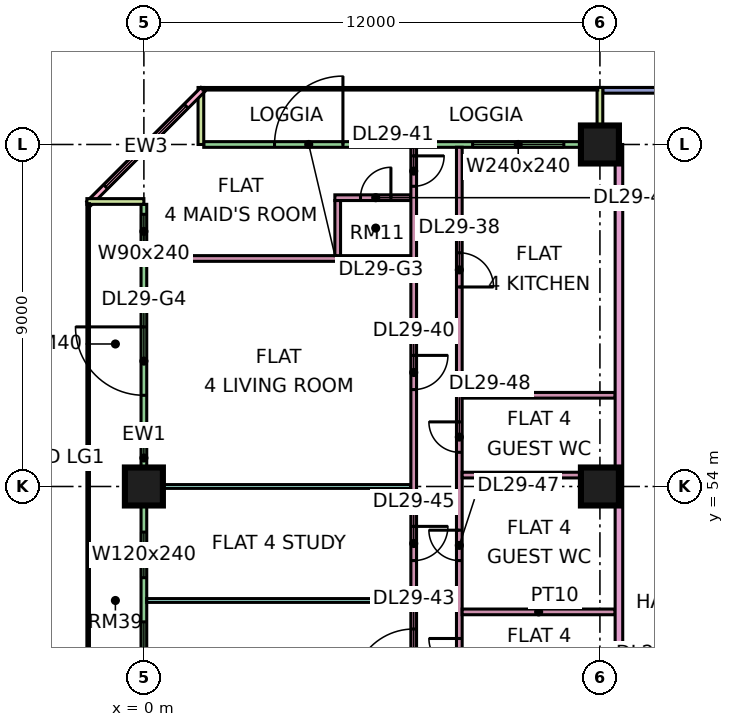
"""IFC4 building model, lengths in metres.
Left out: names, types, materials, properties, quantities, classifications, styles, units other than length and angle.
Written with IfcOpenShell. Run it as: python <this file> out.ifc"""

import sys

from ifc_helpers import new_model, si_unit, direction, frame, frame_2d, origin, origin_2d, place, context, subcontext, project, spatial, rectangle, extrude, element, fill, save


model = new_model("IFC4")
c1 = context("Model", 3, precision=1e-05, world=origin(), true_north=direction((0.0, 1.0)))
c2 = subcontext(c1, "Body", "Model", "MODEL_VIEW")
j1 = project(units=[si_unit("LENGTHUNIT", "METRE"), si_unit("PLANEANGLEUNIT", "RADIAN")], contexts=[c1])
p1 = place(None, origin())
s1 = spatial("IfcSite", under=j1, at=p1, CompositionType="ELEMENT")
p2 = place(p1, origin())
s2 = spatial("IfcBuilding", under=s1, at=p2, CompositionType="ELEMENT")
p3 = place(p2, frame((0.0, 0.0, 125.65)))
s3 = spatial("IfcBuildingStorey", under=s2, at=p3, CompositionType="ELEMENT", Elevation=125.65)
for number, where, z_axis, x_axis in (
    (1, (0.0, 54.0, 0.0), (0.0, 0.0, 1.0), (1.0, 0.0, 0.0)),
    (2, (12.0, 54.0, 0.0), (0.0, 0.0, 1.0), (1.0, 0.0, 0.0)),
    (3, (12.0, 63.0, 0.0), (0.0, 0.0, 1.0), (1.0, 0.0, 0.0)),
):
    element("IfcColumn", number, at=place(p3, frame(where, z_axis=z_axis, x_axis=x_axis)), inside=s3, PredefinedType="COLUMN", context=c2, shape_type="SweptSolid", body=[
        extrude(rectangle(XDim=1.0, YDim=1.0, at=origin_2d()), origin(), (0.0, 0.0, 1.0), 3.75),
    ])
p4 = place(p3, frame((22.5, 64.425, 0.0), z_axis=(0.0, 0.0, 1.0), x_axis=(-1.0, 0.0, 0.0)))
e4 = element("IfcWall", 4, at=p4, inside=s3, PredefinedType="SOLIDWALL", context=c2, shape_type="SweptSolid", body=[
    extrude(rectangle(XDim=10.425, YDim=0.15, at=frame_2d((5.212, 0.0))), origin(), (0.0, 0.0, 1.0), 3.35),
])
p5 = place(p4, frame((1.95, 0.0, 0.45)))
e5 = element("IfcOpeningElement", 5, at=p5, cuts=e4, PredefinedType="OPENING", context=c2, shape_type="SweptSolid", body=[
    extrude(rectangle(XDim=3.0, YDim=2.4, at=frame_2d((1.5, 1.2))), frame((0.0, 0.085, 0.0), z_axis=(0.0, -1.0, 0.0), x_axis=(1.0, 0.0, 0.0)), (0.0, 0.0, 1.0), 0.17),
])
p6 = place(p3, frame((11.925, 63.0, 0.0), z_axis=(0.0, 0.0, 1.0), x_axis=(-1.0, 0.0, 0.0)))
e6 = element("IfcWall", 6, at=p6, inside=s3, PredefinedType="SOLIDWALL", context=c2, shape_type="SweptSolid", body=[
    extrude(rectangle(XDim=10.35, YDim=0.15, at=frame_2d((5.175, 0.0))), origin(), (0.0, 0.0, 1.0), 3.35),
])
p7 = place(p6, frame((0.875, 0.0, 0.45)))
e7 = element("IfcOpeningElement", 7, at=p7, cuts=e6, PredefinedType="OPENING", context=c2, shape_type="SweptSolid", body=[
    extrude(rectangle(XDim=2.4, YDim=2.4, at=frame_2d((1.2, 1.2))), frame((0.0, 0.085, 0.0), z_axis=(0.0, -1.0, 0.0), x_axis=(1.0, 0.0, 0.0)), (0.0, 0.0, 1.0), 0.17),
])
p8 = place(p6, frame((6.688, 0.0, 0.0)))
e8 = element("IfcOpeningElement", 8, at=p8, cuts=e6, PredefinedType="OPENING", context=c2, shape_type="SweptSolid", body=[
    extrude(rectangle(XDim=1.8, YDim=2.4, at=frame_2d((0.9, 1.2))), frame((0.0, 0.085, 0.0), z_axis=(0.0, -1.0, 0.0), x_axis=(1.0, 0.0, 0.0)), (0.0, 0.0, 1.0), 0.17),
])
for number, where, z_axis, x_axis in (
    (9, (12.0, 64.5, 0.0), (0.0, 0.0, 1.0), (0.0, -1.0, 0.0)),
    (10, (1.5, 64.5, 0.0), (0.0, 0.0, 1.0), (0.0, -1.0, 0.0)),
):
    element("IfcWall", number, at=place(p3, frame(where, z_axis=z_axis, x_axis=x_axis)), inside=s3, PredefinedType="SOLIDWALL", context=c2, shape_type="SweptSolid", body=[
        extrude(rectangle(XDim=1.5, YDim=0.15, at=frame_2d((0.75, 0.0))), origin(), (0.0, 0.0, 1.0), 3.35),
    ])
p9 = place(p3, frame((1.553, 64.447, 0.0), z_axis=(0.0, 0.0, 1.0), x_axis=(-0.707106781187, -0.707106781187, 0.0)))
e11 = element("IfcWall", 11, at=p9, inside=s3, PredefinedType="SOLIDWALL", context=c2, shape_type="SweptSolid", body=[
    extrude(rectangle(XDim=4.243, YDim=0.15, at=frame_2d((2.121, 0.0))), origin(), (0.0, 0.0, 1.0), 3.35),
])
p10 = place(p9, frame((0.621, 0.0, 0.45)))
e12 = element("IfcOpeningElement", 12, at=p10, cuts=e11, PredefinedType="OPENING", context=c2, shape_type="SweptSolid", body=[
    extrude(rectangle(XDim=3.0, YDim=2.4, at=frame_2d((1.5, 1.2))), frame((0.0, 0.085, 0.0), z_axis=(0.0, -1.0, 0.0), x_axis=(1.0, 0.0, 0.0)), (0.0, 0.0, 1.0), 0.17),
])
p11 = place(p3, frame((0.0, 61.425, 0.0), z_axis=(0.0, 0.0, 1.0), x_axis=(0.0, -1.0, 0.0)))
e13 = element("IfcWall", 13, at=p11, inside=s3, PredefinedType="SOLIDWALL", context=c2, shape_type="SweptSolid", body=[
    extrude(rectangle(XDim=13.35, YDim=0.15, at=frame_2d((6.675, 0.0))), origin(), (0.0, 0.0, 1.0), 3.35),
])
p12 = place(p11, frame((0.262, 0.0, 0.45)))
e14 = element("IfcOpeningElement", 14, at=p12, cuts=e13, PredefinedType="OPENING", context=c2, shape_type="SweptSolid", body=[
    extrude(rectangle(XDim=0.9, YDim=2.4, at=frame_2d((0.45, 1.2))), frame((0.0, 0.085, 0.0), z_axis=(0.0, -1.0, 0.0), x_axis=(1.0, 0.0, 0.0)), (0.0, 0.0, 1.0), 0.17),
])
p13 = place(p11, frame((3.225, 0.0, 0.0)))
e15 = element("IfcOpeningElement", 15, at=p13, cuts=e13, PredefinedType="OPENING", context=c2, shape_type="SweptSolid", body=[
    extrude(rectangle(XDim=1.8, YDim=2.4, at=frame_2d((0.9, 1.2))), frame((0.0, 0.085, 0.0), z_axis=(0.0, -1.0, 0.0), x_axis=(1.0, 0.0, 0.0)), (0.0, 0.0, 1.0), 0.17),
])
p14 = place(p11, frame((8.625, 0.0, 0.45)))
e16 = element("IfcOpeningElement", 16, at=p14, cuts=e13, PredefinedType="OPENING", context=c2, shape_type="SweptSolid", body=[
    extrude(rectangle(XDim=1.2, YDim=2.4, at=frame_2d((0.6, 1.2))), frame((0.0, 0.085, 0.0), z_axis=(0.0, -1.0, 0.0), x_axis=(1.0, 0.0, 0.0)), (0.0, 0.0, 1.0), 0.17),
])
p15 = place(p11, frame((10.988, 0.0, 0.45)))
e17 = element("IfcOpeningElement", 17, at=p15, cuts=e13, PredefinedType="OPENING", context=c2, shape_type="SweptSolid", body=[
    extrude(rectangle(XDim=1.8, YDim=2.4, at=frame_2d((0.9, 1.2))), frame((0.0, 0.085, 0.0), z_axis=(0.0, -1.0, 0.0), x_axis=(1.0, 0.0, 0.0)), (0.0, 0.0, 1.0), 0.17),
])
p16 = place(p3, frame((-1.5, 61.5, 0.0), z_axis=(0.0, 0.0, 1.0), x_axis=(1.0, 0.0, 0.0)))
e18 = element("IfcWall", 18, at=p16, inside=s3, PredefinedType="SOLIDWALL", context=c2, shape_type="SweptSolid", body=[
    extrude(rectangle(XDim=1.5, YDim=0.15, at=frame_2d((0.75, 0.0))), origin(), (0.0, 0.0, 1.0), 3.35),
])
for number, where, z_axis, x_axis in (
    (19, (0.074, 51.0, 0.0), (0.0, 0.0, 1.0), (1.0, 0.0, 0.0)),
    (20, (0.074, 54.0, 0.0), (0.0, 0.0, 1.0), (1.0, 0.0, 0.0)),
):
    element("IfcWall", number, at=place(p3, frame(where, z_axis=z_axis, x_axis=x_axis)), inside=s3, PredefinedType="PARTITIONING", context=c2, shape_type="SweptSolid", body=[
        extrude(rectangle(XDim=6.951, YDim=0.1, at=frame_2d((3.476, 0.0))), origin(), (0.0, 0.0, 1.0), 3.35),
    ])
p17 = place(p3, frame((0.074, 60.0, 0.0), z_axis=(0.0, 0.0, 1.0), x_axis=(1.0, 0.0, 0.0)))
e21 = element("IfcWall", 21, at=p17, inside=s3, PredefinedType="PARTITIONING", context=c2, shape_type="SweptSolid", body=[
    extrude(rectangle(XDim=6.951, YDim=0.15, at=frame_2d((3.476, 0.0))), origin(), (0.0, 0.0, 1.0), 3.35),
])
p18 = place(p3, frame((5.025, 61.6, 0.0), z_axis=(0.0, 0.0, 1.0), x_axis=(1.0, 0.0, 0.0)))
e22 = element("IfcWall", 22, at=p18, inside=s3, PredefinedType="PARTITIONING", context=c2, shape_type="SweptSolid", body=[
    extrude(rectangle(XDim=2.0, YDim=0.15, at=frame_2d((1.0, 0.0))), origin(), (0.0, 0.0, 1.0), 3.35),
])
p19 = place(p18, frame((0.675, 0.0, 0.0)))
e23 = element("IfcOpeningElement", 23, at=p19, cuts=e22, PredefinedType="OPENING", context=c2, shape_type="SweptSolid", body=[
    extrude(rectangle(XDim=0.8, YDim=2.1, at=frame_2d((0.4, 1.05))), frame((0.0, 0.085, 0.0), z_axis=(0.0, -1.0, 0.0), x_axis=(1.0, 0.0, 0.0)), (0.0, 0.0, 1.0), 0.17),
])
p20 = place(p3, frame((5.1, 60.075, 0.0), z_axis=(0.0, 0.0, 1.0), x_axis=(0.0, 1.0, 0.0)))
e24 = element("IfcWall", 24, at=p20, inside=s3, PredefinedType="PARTITIONING", context=c2, shape_type="SweptSolid", body=[
    extrude(rectangle(XDim=1.45, YDim=0.15, at=frame_2d((0.725, 0.0))), origin(), (0.0, 0.0, 1.0), 3.35),
])
p21 = place(p3, frame((7.1, 36.1, 0.0), z_axis=(0.0, 0.0, 1.0), x_axis=(0.0, 1.0, 0.0)))
e25 = element("IfcWall", 25, at=p21, inside=s3, PredefinedType="PARTITIONING", context=c2, shape_type="SweptSolid", body=[
    extrude(rectangle(XDim=26.826, YDim=0.15, at=frame_2d((13.413, 0.0))), origin(), (0.0, 0.0, 1.0), 3.35),
])
p22 = place(p21, frame((0.95, 0.0, 0.0)))
e26 = element("IfcOpeningElement", 26, at=p22, cuts=e25, PredefinedType="OPENING", context=c2, shape_type="SweptSolid", body=[
    extrude(rectangle(XDim=0.9, YDim=2.1, at=frame_2d((0.45, 1.05))), frame((0.0, 0.085, 0.0), z_axis=(0.0, -1.0, 0.0), x_axis=(1.0, 0.0, 0.0)), (0.0, 0.0, 1.0), 0.17),
])
p23 = place(p21, frame((9.95, 0.0, 0.0)))
e27 = element("IfcOpeningElement", 27, at=p23, cuts=e25, PredefinedType="OPENING", context=c2, shape_type="SweptSolid", body=[
    extrude(rectangle(XDim=0.9, YDim=2.1, at=frame_2d((0.45, 1.05))), frame((0.0, 0.085, 0.0), z_axis=(0.0, -1.0, 0.0), x_axis=(1.0, 0.0, 0.0)), (0.0, 0.0, 1.0), 0.17),
])
p24 = place(p21, frame((6.95, 0.0, 0.0)))
e28 = element("IfcOpeningElement", 28, at=p24, cuts=e25, PredefinedType="OPENING", context=c2, shape_type="SweptSolid", body=[
    extrude(rectangle(XDim=0.9, YDim=2.1, at=frame_2d((0.45, 1.05))), frame((0.0, 0.085, 0.0), z_axis=(0.0, -1.0, 0.0), x_axis=(1.0, 0.0, 0.0)), (0.0, 0.0, 1.0), 0.17),
])
p25 = place(p21, frame((20.45, 0.0, 0.0)))
e29 = element("IfcOpeningElement", 29, at=p25, cuts=e25, PredefinedType="OPENING", context=c2, shape_type="SweptSolid", body=[
    extrude(rectangle(XDim=0.9, YDim=2.1, at=frame_2d((0.45, 1.05))), frame((0.0, 0.085, 0.0), z_axis=(0.0, -1.0, 0.0), x_axis=(1.0, 0.0, 0.0)), (0.0, 0.0, 1.0), 0.17),
])
p26 = place(p21, frame((25.8, 0.0, 0.0)))
e30 = element("IfcOpeningElement", 30, at=p26, cuts=e25, PredefinedType="OPENING", context=c2, shape_type="SweptSolid", body=[
    extrude(rectangle(XDim=0.8, YDim=2.1, at=frame_2d((0.4, 1.05))), frame((0.0, 0.085, 0.0), z_axis=(0.0, -1.0, 0.0), x_axis=(1.0, 0.0, 0.0)), (0.0, 0.0, 1.0), 0.17),
])
p27 = place(p21, frame((12.55, 0.0, 0.0)))
e31 = element("IfcOpeningElement", 31, at=p27, cuts=e25, PredefinedType="OPENING", context=c2, shape_type="SweptSolid", body=[
    extrude(rectangle(XDim=1.6, YDim=2.1, at=frame_2d((0.8, 1.05))), frame((0.0, 0.085, 0.0), z_axis=(0.0, -1.0, 0.0), x_axis=(1.0, 0.0, 0.0)), (0.0, 0.0, 1.0), 0.17),
])
p28 = place(p21, frame((15.95, 0.0, 0.0)))
e32 = element("IfcOpeningElement", 32, at=p28, cuts=e25, PredefinedType="OPENING", context=c2, shape_type="SweptSolid", body=[
    extrude(rectangle(XDim=0.9, YDim=2.1, at=frame_2d((0.45, 1.05))), frame((0.0, 0.085, 0.0), z_axis=(0.0, -1.0, 0.0), x_axis=(1.0, 0.0, 0.0)), (0.0, 0.0, 1.0), 0.17),
])
p29 = place(p3, frame((8.3, 41.625, 0.0), z_axis=(0.0, 0.0, 1.0), x_axis=(0.0, 1.0, 0.0)))
e33 = element("IfcWall", 33, at=p29, inside=s3, PredefinedType="PARTITIONING", context=c2, shape_type="SweptSolid", body=[
    extrude(rectangle(XDim=21.301, YDim=0.15, at=frame_2d((10.65, 0.0))), origin(), (0.0, 0.0, 1.0), 3.35),
])
p30 = place(p29, frame((4.725, 0.0, 0.0)))
e34 = element("IfcOpeningElement", 34, at=p30, cuts=e33, PredefinedType="OPENING", context=c2, shape_type="SweptSolid", body=[
    extrude(rectangle(XDim=0.8, YDim=2.1, at=frame_2d((0.4, 1.05))), frame((0.0, 0.085, 0.0), z_axis=(0.0, -1.0, 0.0), x_axis=(1.0, 0.0, 0.0)), (0.0, 0.0, 1.0), 0.17),
])
p31 = place(p29, frame((17.625, 0.0, 0.0)))
e35 = element("IfcOpeningElement", 35, at=p31, cuts=e33, PredefinedType="OPENING", context=c2, shape_type="SweptSolid", body=[
    extrude(rectangle(XDim=0.9, YDim=2.1, at=frame_2d((0.45, 1.05))), frame((0.0, 0.085, 0.0), z_axis=(0.0, -1.0, 0.0), x_axis=(1.0, 0.0, 0.0)), (0.0, 0.0, 1.0), 0.17),
])
p32 = place(p29, frame((1.275, 0.0, 0.0)))
e36 = element("IfcOpeningElement", 36, at=p32, cuts=e33, PredefinedType="OPENING", context=c2, shape_type="SweptSolid", body=[
    extrude(rectangle(XDim=0.8, YDim=2.1, at=frame_2d((0.4, 1.05))), frame((0.0, 0.085, 0.0), z_axis=(0.0, -1.0, 0.0), x_axis=(1.0, 0.0, 0.0)), (0.0, 0.0, 1.0), 0.17),
])
p33 = place(p29, frame((7.575, 0.0, 0.0)))
e37 = element("IfcOpeningElement", 37, at=p33, cuts=e33, PredefinedType="OPENING", context=c2, shape_type="SweptSolid", body=[
    extrude(rectangle(XDim=0.8, YDim=2.1, at=frame_2d((0.4, 1.05))), frame((0.0, 0.085, 0.0), z_axis=(0.0, -1.0, 0.0), x_axis=(1.0, 0.0, 0.0)), (0.0, 0.0, 1.0), 0.17),
])
p34 = place(p29, frame((10.425, 0.0, 0.0)))
e38 = element("IfcOpeningElement", 38, at=p34, cuts=e33, PredefinedType="OPENING", context=c2, shape_type="SweptSolid", body=[
    extrude(rectangle(XDim=0.8, YDim=2.1, at=frame_2d((0.4, 1.05))), frame((0.0, 0.085, 0.0), z_axis=(0.0, -1.0, 0.0), x_axis=(1.0, 0.0, 0.0)), (0.0, 0.0, 1.0), 0.17),
])
p35 = place(p29, frame((13.275, 0.0, 0.0)))
e39 = element("IfcOpeningElement", 39, at=p35, cuts=e33, PredefinedType="OPENING", context=c2, shape_type="SweptSolid", body=[
    extrude(rectangle(XDim=0.8, YDim=2.1, at=frame_2d((0.4, 1.05))), frame((0.0, 0.085, 0.0), z_axis=(0.0, -1.0, 0.0), x_axis=(1.0, 0.0, 0.0)), (0.0, 0.0, 1.0), 0.17),
])
for number, where, z_axis, x_axis in (
    (40, (8.375, 50.7, 0.0), (0.0, 0.0, 1.0), (1.0, 0.0, 0.0)),
    (41, (8.375, 54.3, 0.0), (0.0, 0.0, 1.0), (1.0, 0.0, 0.0)),
    (42, (8.375, 56.4, 0.0), (0.0, 0.0, 1.0), (1.0, 0.0, 0.0)),
):
    element("IfcWall", number, at=place(p3, frame(where, z_axis=z_axis, x_axis=x_axis)), inside=s3, PredefinedType="PARTITIONING", context=c2, shape_type="SweptSolid", body=[
        extrude(rectangle(XDim=4.025, YDim=0.15, at=frame_2d((2.012, 0.0))), origin(), (0.0, 0.0, 1.0), 3.35),
    ])
p36 = place(p3, frame((12.5, 20.0, 0.0), z_axis=(0.0, 0.0, 1.0), x_axis=(0.0, 1.0, 0.0)))
e43 = element("IfcWall", 43, at=p36, inside=s3, PredefinedType="PARTITIONING", context=c2, shape_type="SweptSolid", body=[
    extrude(rectangle(XDim=43.0, YDim=0.2, at=frame_2d((21.5, 0.0))), origin(), (0.0, 0.0, 1.0), 3.35),
])
p37 = place(p36, frame((19.65, 0.0, 0.0)))
e44 = element("IfcOpeningElement", 44, at=p37, cuts=e43, PredefinedType="OPENING", context=c2, shape_type="SweptSolid", body=[
    extrude(rectangle(XDim=1.0, YDim=2.1, at=frame_2d((0.5, 1.05))), frame((0.0, 0.11, 0.0), z_axis=(0.0, -1.0, 0.0), x_axis=(1.0, 0.0, 0.0)), (0.0, 0.0, 1.0), 0.22),
])
p38 = place(p36, frame((0.6, 0.0, 0.0)))
e45 = element("IfcOpeningElement", 45, at=p38, cuts=e43, PredefinedType="OPENING", context=c2, shape_type="SweptSolid", body=[
    extrude(rectangle(XDim=1.2, YDim=2.1, at=frame_2d((0.6, 1.05))), frame((0.0, 0.11, 0.0), z_axis=(0.0, -1.0, 0.0), x_axis=(1.0, 0.0, 0.0)), (0.0, 0.0, 1.0), 0.22),
])
p39 = place(p36, frame((4.5, 0.0, 0.0)))
e46 = element("IfcOpeningElement", 46, at=p39, cuts=e43, PredefinedType="OPENING", context=c2, shape_type="SweptSolid", body=[
    extrude(rectangle(XDim=1.0, YDim=2.1, at=frame_2d((0.5, 1.05))), frame((0.0, 0.11, 0.0), z_axis=(0.0, -1.0, 0.0), x_axis=(1.0, 0.0, 0.0)), (0.0, 0.0, 1.0), 0.22),
])
p40 = place(p7, origin())
e47 = element("IfcWindow", 47, at=p40, inside=s3, PartitioningType="SINGLE_PANEL", PredefinedType="WINDOW", context=c2, shape_type="SweptSolid", body=[
    extrude(rectangle(XDim=2.4, YDim=2.4, at=frame_2d((1.2, 1.2))), frame((0.0, 0.03, 0.0), z_axis=(0.0, -1.0, 0.0), x_axis=(1.0, 0.0, 0.0)), (0.0, 0.0, 1.0), 0.06),
])
fill(e7, e47)
p41 = place(p8, frame((1.8, 0.0, 0.0), z_axis=(0.0, 0.0, 1.0), x_axis=(-1.0, 0.0, 0.0)))
e48 = element("IfcDoor", 48, at=p41, inside=s3, OperationType="DOUBLE_DOOR_SINGLE_SWING", PredefinedType="DOOR", context=c2, shape_type="SweptSolid", body=[
    extrude(rectangle(XDim=1.8, YDim=2.4, at=frame_2d((0.9, 1.2))), frame((0.0, 0.025, 0.0), z_axis=(0.0, -1.0, 0.0), x_axis=(1.0, 0.0, 0.0)), (0.0, 0.0, 1.0), 0.05),
])
fill(e8, e48)
p42 = place(p10, origin())
e49 = element("IfcWindow", 49, at=p42, inside=s3, PartitioningType="SINGLE_PANEL", PredefinedType="WINDOW", context=c2, shape_type="SweptSolid", body=[
    extrude(rectangle(XDim=3.0, YDim=2.4, at=frame_2d((1.5, 1.2))), frame((0.0, 0.03, 0.0), z_axis=(0.0, -1.0, 0.0), x_axis=(1.0, 0.0, 0.0)), (0.0, 0.0, 1.0), 0.06),
])
fill(e12, e49)
p43 = place(p12, origin())
e50 = element("IfcWindow", 50, at=p43, inside=s3, PartitioningType="SINGLE_PANEL", PredefinedType="WINDOW", context=c2, shape_type="SweptSolid", body=[
    extrude(rectangle(XDim=0.9, YDim=2.4, at=frame_2d((0.45, 1.2))), frame((0.0, 0.03, 0.0), z_axis=(0.0, -1.0, 0.0), x_axis=(1.0, 0.0, 0.0)), (0.0, 0.0, 1.0), 0.06),
])
fill(e14, e50)
p44 = place(p13, frame((1.8, 0.0, 0.0), z_axis=(0.0, 0.0, 1.0), x_axis=(-1.0, 0.0, 0.0)))
e51 = element("IfcDoor", 51, at=p44, inside=s3, OperationType="DOUBLE_DOOR_SINGLE_SWING", PredefinedType="DOOR", context=c2, shape_type="SweptSolid", body=[
    extrude(rectangle(XDim=1.8, YDim=2.4, at=frame_2d((0.9, 1.2))), frame((0.0, 0.025, 0.0), z_axis=(0.0, -1.0, 0.0), x_axis=(1.0, 0.0, 0.0)), (0.0, 0.0, 1.0), 0.05),
])
fill(e15, e51)
p45 = place(p14, origin())
e52 = element("IfcWindow", 52, at=p45, inside=s3, PartitioningType="SINGLE_PANEL", PredefinedType="WINDOW", context=c2, shape_type="SweptSolid", body=[
    extrude(rectangle(XDim=1.2, YDim=2.4, at=frame_2d((0.6, 1.2))), frame((0.0, 0.03, 0.0), z_axis=(0.0, -1.0, 0.0), x_axis=(1.0, 0.0, 0.0)), (0.0, 0.0, 1.0), 0.06),
])
fill(e16, e52)
p46 = place(p15, origin())
e53 = element("IfcWindow", 53, at=p46, inside=s3, PartitioningType="SINGLE_PANEL", PredefinedType="WINDOW", context=c2, shape_type="SweptSolid", body=[
    extrude(rectangle(XDim=1.8, YDim=2.4, at=frame_2d((0.9, 1.2))), frame((0.0, 0.03, 0.0), z_axis=(0.0, -1.0, 0.0), x_axis=(1.0, 0.0, 0.0)), (0.0, 0.0, 1.0), 0.06),
])
fill(e17, e53)
p47 = place(p31, frame((0.9, 0.0, 0.0), z_axis=(0.0, 0.0, 1.0), x_axis=(-1.0, 0.0, 0.0)))
e54 = element("IfcDoor", 54, at=p47, inside=s3, OperationType="SINGLE_SWING_LEFT", PredefinedType="DOOR", context=c2, shape_type="SweptSolid", body=[
    extrude(rectangle(XDim=0.9, YDim=2.1, at=frame_2d((0.45, 1.05))), frame((0.0, 0.025, 0.0), z_axis=(0.0, -1.0, 0.0), x_axis=(1.0, 0.0, 0.0)), (0.0, 0.0, 1.0), 0.05),
])
fill(e35, e54)
p48 = place(p25, origin())
e55 = element("IfcDoor", 55, at=p48, inside=s3, OperationType="SINGLE_SWING_RIGHT", PredefinedType="DOOR", context=c2, shape_type="SweptSolid", body=[
    extrude(rectangle(XDim=0.9, YDim=2.1, at=frame_2d((0.45, 1.05))), frame((0.0, 0.025, 0.0), z_axis=(0.0, -1.0, 0.0), x_axis=(1.0, 0.0, 0.0)), (0.0, 0.0, 1.0), 0.05),
])
fill(e29, e55)
p49 = place(p26, origin())
e56 = element("IfcDoor", 56, at=p49, inside=s3, OperationType="SINGLE_SWING_RIGHT", PredefinedType="DOOR", context=c2, shape_type="SweptSolid", body=[
    extrude(rectangle(XDim=0.8, YDim=2.1, at=frame_2d((0.4, 1.05))), frame((0.0, 0.025, 0.0), z_axis=(0.0, -1.0, 0.0), x_axis=(1.0, 0.0, 0.0)), (0.0, 0.0, 1.0), 0.05),
])
fill(e30, e56)
p50 = place(p19, frame((0.8, 0.0, 0.0), z_axis=(0.0, 0.0, 1.0), x_axis=(-1.0, 0.0, 0.0)))
e57 = element("IfcDoor", 57, at=p50, inside=s3, OperationType="SINGLE_SWING_RIGHT", PredefinedType="DOOR", context=c2, shape_type="SweptSolid", body=[
    extrude(rectangle(XDim=0.8, YDim=2.1, at=frame_2d((0.4, 1.05))), frame((0.0, 0.025, 0.0), z_axis=(0.0, -1.0, 0.0), x_axis=(1.0, 0.0, 0.0)), (0.0, 0.0, 1.0), 0.05),
])
fill(e23, e57)
p51 = place(p27, origin())
e58 = element("IfcDoor", 58, at=p51, inside=s3, OperationType="DOUBLE_DOOR_SINGLE_SWING", PredefinedType="DOOR", context=c2, shape_type="SweptSolid", body=[
    extrude(rectangle(XDim=1.6, YDim=2.1, at=frame_2d((0.8, 1.05))), frame((0.0, 0.025, 0.0), z_axis=(0.0, -1.0, 0.0), x_axis=(1.0, 0.0, 0.0)), (0.0, 0.0, 1.0), 0.05),
])
fill(e31, e58)
p52 = place(p28, origin())
e59 = element("IfcDoor", 59, at=p52, inside=s3, OperationType="SINGLE_SWING_RIGHT", PredefinedType="DOOR", context=c2, shape_type="SweptSolid", body=[
    extrude(rectangle(XDim=0.9, YDim=2.1, at=frame_2d((0.45, 1.05))), frame((0.0, 0.025, 0.0), z_axis=(0.0, -1.0, 0.0), x_axis=(1.0, 0.0, 0.0)), (0.0, 0.0, 1.0), 0.05),
])
fill(e32, e59)
p53 = place(p33, frame((0.8, 0.0, 0.0), z_axis=(0.0, 0.0, 1.0), x_axis=(-1.0, 0.0, 0.0)))
e60 = element("IfcDoor", 60, at=p53, inside=s3, OperationType="SINGLE_SWING_RIGHT", PredefinedType="DOOR", context=c2, shape_type="SweptSolid", body=[
    extrude(rectangle(XDim=0.8, YDim=2.1, at=frame_2d((0.4, 1.05))), frame((0.0, 0.025, 0.0), z_axis=(0.0, -1.0, 0.0), x_axis=(1.0, 0.0, 0.0)), (0.0, 0.0, 1.0), 0.05),
])
fill(e37, e60)
p54 = place(p34, frame((0.8, 0.0, 0.0), z_axis=(0.0, 0.0, 1.0), x_axis=(-1.0, 0.0, 0.0)))
e61 = element("IfcDoor", 61, at=p54, inside=s3, OperationType="SINGLE_SWING_RIGHT", PredefinedType="DOOR", context=c2, shape_type="SweptSolid", body=[
    extrude(rectangle(XDim=0.8, YDim=2.1, at=frame_2d((0.4, 1.05))), frame((0.0, 0.025, 0.0), z_axis=(0.0, -1.0, 0.0), x_axis=(1.0, 0.0, 0.0)), (0.0, 0.0, 1.0), 0.05),
])
fill(e38, e61)
p55 = place(p35, frame((0.8, 0.0, 0.0), z_axis=(0.0, 0.0, 1.0), x_axis=(-1.0, 0.0, 0.0)))
e62 = element("IfcDoor", 62, at=p55, inside=s3, OperationType="SINGLE_SWING_RIGHT", PredefinedType="DOOR", context=c2, shape_type="SweptSolid", body=[
    extrude(rectangle(XDim=0.8, YDim=2.1, at=frame_2d((0.4, 1.05))), frame((0.0, 0.025, 0.0), z_axis=(0.0, -1.0, 0.0), x_axis=(1.0, 0.0, 0.0)), (0.0, 0.0, 1.0), 0.05),
])
fill(e39, e62)
save(model, sys.argv[1])
